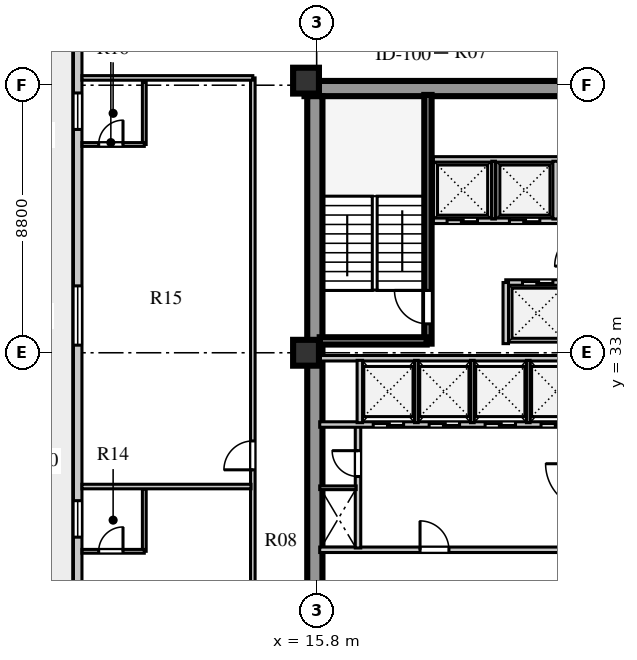
"""IFC4 building model, lengths in metres.
Left out: names, types, materials, properties, quantities, classifications, styles, units other than length and angle.
Written with IfcOpenShell. Run it as: python <this file> out.ifc"""

import sys

from ifc_helpers import new_model, si_unit, direction, frame, frame_2d, origin, origin_2d, place, context, subcontext, project, spatial, rectangle, extrude, element, fill, save


model = new_model("IFC4")
c1 = context("Model", 3, precision=1e-05, world=origin(), true_north=direction((0.0, 1.0)))
c2 = subcontext(c1, "Body", "Model", "MODEL_VIEW")
j1 = project(units=[si_unit("LENGTHUNIT", "METRE"), si_unit("PLANEANGLEUNIT", "RADIAN")], contexts=[c1])
p1 = place(None, origin())
s1 = spatial("IfcSite", under=j1, at=p1, CompositionType="ELEMENT")
p2 = place(p1, origin())
s2 = spatial("IfcBuilding", under=s1, at=p2, CompositionType="ELEMENT")
p3 = place(p2, frame((0.0, 0.0, 196.4)))
s3 = spatial("IfcBuildingStorey", under=s2, at=p3, CompositionType="ELEMENT", Elevation=196.4)
p4 = place(p3, frame((15.4, 41.69, 0.0), z_axis=(0.0, 0.0, 1.0), x_axis=(1.0, 0.0, 0.0)))
e1 = element("IfcWall", 1, at=p4, inside=s3, PredefinedType="SHEAR", context=c2, shape_type="SweptSolid", body=[
    extrude(rectangle(XDim=9.68, YDim=0.5, at=frame_2d((4.84, 0.0))), origin(), (0.0, 0.0, 1.0), 3.6),
])
p5 = place(p3, frame((15.74, 15.81, 0.0), z_axis=(0.0, 0.0, 1.0), x_axis=(0.0, 1.0, 0.0)))
e2 = element("IfcWall", 2, at=p5, inside=s3, PredefinedType="SHEAR", context=c2, shape_type="SweptSolid", body=[
    extrude(rectangle(XDim=25.63, YDim=0.5, at=frame_2d((12.815, 0.0))), origin(), (0.0, 0.0, 1.0), 3.6),
])
for number, where, z_axis, x_axis in (
    (3, (15.45, 33.0, 0.0), (0.0, 0.0, 1.0), (1.0, 0.0, 0.0)),
    (4, (15.45, 41.95, 0.0), (0.0, 0.0, 1.0), (1.0, 0.0, 0.0)),
):
    element("IfcColumn", number, at=place(p3, frame(where, z_axis=z_axis, x_axis=x_axis)), inside=s3, PredefinedType="COLUMN", context=c2, shape_type="SweptSolid", body=[
        extrude(rectangle(XDim=0.85, YDim=0.85, at=origin_2d()), origin(), (0.0, 0.0, 1.0), 3.6),
    ])
p6 = place(p3, frame((7.94, 44.07, 0.0), z_axis=(0.0, 0.0, 1.0), x_axis=(0.0, -1.0, 0.0)))
e5 = element("IfcWall", 5, at=p6, inside=s3, PredefinedType="STANDARD", context=c2, shape_type="SweptSolid", body=[
    extrude(rectangle(XDim=30.94, YDim=0.28, at=frame_2d((15.47, 0.0))), origin(), (0.0, 0.0, 1.0), 3.6),
])
p7 = place(p6, frame((27.42, 0.0, 0.0)))
e6 = element("IfcOpeningElement", 6, at=p7, cuts=e5, PredefinedType="OPENING", context=c2, shape_type="SweptSolid", body=[
    extrude(rectangle(XDim=1.0, YDim=2.05, at=frame_2d((0.5, 1.025))), frame((0.0, 0.15, 0.0), z_axis=(0.0, -1.0, 0.0), x_axis=(1.0, 0.0, 0.0)), (0.0, 0.0, 1.0), 0.3),
])
p8 = place(p6, frame((21.805, 0.0, 0.8)))
e7 = element("IfcOpeningElement", 7, at=p8, cuts=e5, PredefinedType="OPENING", context=c2, shape_type="SweptSolid", body=[
    extrude(rectangle(XDim=1.35, YDim=1.9, at=frame_2d((0.675, 0.95))), frame((0.0, 0.15, 0.0), z_axis=(0.0, -1.0, 0.0), x_axis=(1.0, 0.0, 0.0)), (0.0, 0.0, 1.0), 0.3),
])
p9 = place(p6, frame((15.935, 0.0, 0.8)))
e8 = element("IfcOpeningElement", 8, at=p9, cuts=e5, PredefinedType="OPENING", context=c2, shape_type="SweptSolid", body=[
    extrude(rectangle(XDim=1.2, YDim=1.75, at=frame_2d((0.6, 0.875))), frame((0.0, 0.15, 0.0), z_axis=(0.0, -1.0, 0.0), x_axis=(1.0, 0.0, 0.0)), (0.0, 0.0, 1.0), 0.3),
])
p10 = place(p6, frame((8.87, 0.0, 0.8)))
e9 = element("IfcOpeningElement", 9, at=p10, cuts=e5, PredefinedType="OPENING", context=c2, shape_type="SweptSolid", body=[
    extrude(rectangle(XDim=1.95, YDim=2.0, at=frame_2d((0.975, 1.0))), frame((0.0, 0.15, 0.0), z_axis=(0.0, -1.0, 0.0), x_axis=(1.0, 0.0, 0.0)), (0.0, 0.0, 1.0), 0.3),
])
p11 = place(p6, frame((2.525, 0.0, 0.8)))
e10 = element("IfcOpeningElement", 10, at=p11, cuts=e5, PredefinedType="OPENING", context=c2, shape_type="SweptSolid", body=[
    extrude(rectangle(XDim=1.2, YDim=1.75, at=frame_2d((0.6, 0.875))), frame((0.0, 0.15, 0.0), z_axis=(0.0, -1.0, 0.0), x_axis=(1.0, 0.0, 0.0)), (0.0, 0.0, 1.0), 0.3),
])
p12 = place(p3, frame((15.9, 26.52, 0.0), z_axis=(0.0, 0.0, 1.0), x_axis=(1.0, 0.0, 0.0)))
e11 = element("IfcWall", 11, at=p12, inside=s3, PredefinedType="SOLIDWALL", context=c2, shape_type="SweptSolid", body=[
    extrude(rectangle(XDim=8.68, YDim=0.18, at=frame_2d((4.34, 0.0))), origin(), (0.0, 0.0, 1.0), 3.6),
])
p13 = place(p12, frame((3.3, 0.0, 0.0)))
e12 = element("IfcOpeningElement", 12, at=p13, cuts=e11, PredefinedType="OPENING", context=c2, shape_type="SweptSolid", body=[
    extrude(rectangle(XDim=0.95, YDim=2.1, at=frame_2d((0.475, 1.05))), frame((0.0, 0.1, 0.0), z_axis=(0.0, -1.0, 0.0), x_axis=(1.0, 0.0, 0.0)), (0.0, 0.0, 1.0), 0.2),
])
p14 = place(p3, frame((17.16, 26.58, 0.0), z_axis=(0.0, 0.0, 1.0), x_axis=(0.0, 1.0, 0.0)))
e13 = element("IfcWall", 13, at=p14, inside=s3, PredefinedType="SOLIDWALL", context=c2, shape_type="SweptSolid", body=[
    extrude(rectangle(XDim=4.02, YDim=0.18, at=frame_2d((2.01, 0.0))), origin(), (0.0, 0.0, 1.0), 3.6),
])
p15 = place(p14, frame((2.35, 0.0, 0.0)))
e14 = element("IfcOpeningElement", 14, at=p15, cuts=e13, PredefinedType="OPENING", context=c2, shape_type="SweptSolid", body=[
    extrude(rectangle(XDim=0.85, YDim=2.06, at=frame_2d((0.425, 1.03))), frame((0.0, 0.1, 0.0), z_axis=(0.0, -1.0, 0.0), x_axis=(1.0, 0.0, 0.0)), (0.0, 0.0, 1.0), 0.2),
])
p16 = place(p3, frame((15.9, 28.56, 0.0), z_axis=(0.0, 0.0, 1.0), x_axis=(1.0, 0.0, 0.0)))
e15 = element("IfcWall", 15, at=p16, inside=s3, PredefinedType="PARTITIONING", context=c2, shape_type="SweptSolid", body=[
    extrude(rectangle(XDim=1.2, YDim=0.12, at=frame_2d((0.6, 0.0))), origin(), (0.0, 0.0, 1.0), 3.6),
])
p17 = place(p3, frame((15.9, 30.64, 0.0), z_axis=(0.0, 0.0, 1.0), x_axis=(1.0, 0.0, 0.0)))
e16 = element("IfcWall", 16, at=p17, inside=s3, PredefinedType="SOLIDWALL", context=c2, shape_type="SweptSolid", body=[
    extrude(rectangle(XDim=8.68, YDim=0.18, at=frame_2d((4.34, 0.0))), origin(), (0.0, 0.0, 1.0), 3.6),
])
p18 = place(p17, frame((1.76, 0.0, 0.0)))
e17 = element("IfcOpeningElement", 17, at=p18, cuts=e16, PredefinedType="OPENING", context=c2, shape_type="SweptSolid", body=[
    extrude(rectangle(XDim=1.0, YDim=2.1, at=frame_2d((0.5, 1.05))), frame((0.0, 0.1, 0.0), z_axis=(0.0, -1.0, 0.0), x_axis=(1.0, 0.0, 0.0)), (0.0, 0.0, 1.0), 0.2),
])
p19 = place(p17, frame((3.6, 0.0, 0.0)))
e18 = element("IfcOpeningElement", 18, at=p19, cuts=e16, PredefinedType="OPENING", context=c2, shape_type="SweptSolid", body=[
    extrude(rectangle(XDim=1.0, YDim=2.1, at=frame_2d((0.5, 1.05))), frame((0.0, 0.1, 0.0), z_axis=(0.0, -1.0, 0.0), x_axis=(1.0, 0.0, 0.0)), (0.0, 0.0, 1.0), 0.2),
])
p20 = place(p17, frame((5.44, 0.0, 0.0)))
e19 = element("IfcOpeningElement", 19, at=p20, cuts=e16, PredefinedType="OPENING", context=c2, shape_type="SweptSolid", body=[
    extrude(rectangle(XDim=1.0, YDim=2.1, at=frame_2d((0.5, 1.05))), frame((0.0, 0.1, 0.0), z_axis=(0.0, -1.0, 0.0), x_axis=(1.0, 0.0, 0.0)), (0.0, 0.0, 1.0), 0.2),
])
p21 = place(p17, frame((7.28, 0.0, 0.0)))
e20 = element("IfcOpeningElement", 20, at=p21, cuts=e16, PredefinedType="OPENING", context=c2, shape_type="SweptSolid", body=[
    extrude(rectangle(XDim=1.0, YDim=2.1, at=frame_2d((0.5, 1.05))), frame((0.0, 0.1, 0.0), z_axis=(0.0, -1.0, 0.0), x_axis=(1.0, 0.0, 0.0)), (0.0, 0.0, 1.0), 0.2),
])
p22 = place(p3, frame((15.9, 32.82, 0.0), z_axis=(0.0, 0.0, 1.0), x_axis=(1.0, 0.0, 0.0)))
e21 = element("IfcWall", 21, at=p22, inside=s3, PredefinedType="SOLIDWALL", context=c2, shape_type="SweptSolid", body=[
    extrude(rectangle(XDim=8.68, YDim=0.18, at=frame_2d((4.34, 0.0))), origin(), (0.0, 0.0, 1.0), 2.95),
])
p23 = place(p3, frame((17.22, 30.7, 0.0), z_axis=(0.0, 0.0, 1.0), x_axis=(0.0, 1.0, 0.0)))
e22 = element("IfcWall", 22, at=p23, inside=s3, PredefinedType="SOLIDWALL", context=c2, shape_type="SweptSolid", body=[
    extrude(rectangle(XDim=2.05, YDim=0.18, at=frame_2d((1.025, 0.0))), origin(), (0.0, 0.0, 1.0), 3.6),
])
for number, where, z_axis, x_axis in (
    (23, (19.08, 30.7, 0.0), (0.0, 0.0, 1.0), (0.0, 1.0, 0.0)),
    (24, (20.92, 30.7, 0.0), (0.0, 0.0, 1.0), (0.0, 1.0, 0.0)),
    (25, (22.76, 30.7, 0.0), (0.0, 0.0, 1.0), (0.0, 1.0, 0.0)),
):
    element("IfcWall", number, at=place(p3, frame(where, z_axis=z_axis, x_axis=x_axis)), inside=s3, PredefinedType="PARTITIONING", context=c2, shape_type="SweptSolid", body=[
        extrude(rectangle(XDim=2.05, YDim=0.12, at=frame_2d((1.025, 0.0))), origin(), (0.0, 0.0, 1.0), 3.6),
    ])
p24 = place(p3, frame((19.46, 33.3, 0.0), z_axis=(0.0, 0.0, 1.0), x_axis=(0.0, 1.0, 0.0)))
e26 = element("IfcWall", 26, at=p24, inside=s3, PredefinedType="SHEAR", context=c2, shape_type="SweptSolid", body=[
    extrude(rectangle(XDim=8.18, YDim=0.24, at=frame_2d((4.09, 0.0))), origin(), (0.0, 0.0, 1.0), 3.85),
])
p25 = place(p24, frame((0.65, 0.0, 0.0)))
e27 = element("IfcOpeningElement", 27, at=p25, cuts=e26, PredefinedType="OPENING", context=c2, shape_type="SweptSolid", body=[
    extrude(rectangle(XDim=1.1, YDim=2.1, at=frame_2d((0.55, 1.05))), frame((0.0, 0.13, 0.0), z_axis=(0.0, -1.0, 0.0), x_axis=(1.0, 0.0, 0.0)), (0.0, 0.0, 1.0), 0.26),
])
p26 = place(p3, frame((15.9, 33.39, 0.0), z_axis=(0.0, 0.0, 1.0), x_axis=(1.0, 0.0, 0.0)))
e28 = element("IfcWall", 28, at=p26, inside=s3, PredefinedType="SHEAR", context=c2, shape_type="SweptSolid", body=[
    extrude(rectangle(XDim=3.52, YDim=0.24, at=frame_2d((1.76, 0.0))), origin(), (0.0, 0.0, 1.0), 3.85),
])
p27 = place(p3, frame((22.02, 35.31, 0.0), z_axis=(0.0, 0.0, 1.0), x_axis=(1.0, 0.0, 0.0)))
e29 = element("IfcWall", 29, at=p27, inside=s3, PredefinedType="SOLIDWALL", context=c2, shape_type="SweptSolid", body=[
    extrude(rectangle(XDim=2.56, YDim=0.18, at=frame_2d((1.28, 0.0))), origin(), (0.0, 0.0, 1.0), 3.6),
])
p28 = place(p27, frame((0.55, 0.0, 0.0)))
e30 = element("IfcOpeningElement", 30, at=p28, cuts=e29, PredefinedType="OPENING", context=c2, shape_type="SweptSolid", body=[
    extrude(rectangle(XDim=1.0, YDim=2.1, at=frame_2d((0.5, 1.05))), frame((0.0, 0.1, 0.0), z_axis=(0.0, -1.0, 0.0), x_axis=(1.0, 0.0, 0.0)), (0.0, 0.0, 1.0), 0.2),
])
p29 = place(p3, frame((22.02, 33.3, 0.0), z_axis=(0.0, 0.0, 1.0), x_axis=(0.0, 1.0, 0.0)))
e31 = element("IfcWall", 31, at=p29, inside=s3, PredefinedType="SOLIDWALL", context=c2, shape_type="SweptSolid", body=[
    extrude(rectangle(XDim=2.01, YDim=0.18, at=frame_2d((1.005, 0.0))), origin(), (0.0, 0.0, 1.0), 3.6),
])
p30 = place(p3, frame((19.64, 37.34, 0.0), z_axis=(0.0, 0.0, 1.0), x_axis=(1.0, 0.0, 0.0)))
e32 = element("IfcWall", 32, at=p30, inside=s3, PredefinedType="SOLIDWALL", context=c2, shape_type="SweptSolid", body=[
    extrude(rectangle(XDim=4.94, YDim=0.18, at=frame_2d((2.47, 0.0))), origin(), (0.0, 0.0, 1.0), 3.6),
])
p31 = place(p30, frame((0.45, 0.0, 0.0)))
e33 = element("IfcOpeningElement", 33, at=p31, cuts=e32, PredefinedType="OPENING", context=c2, shape_type="SweptSolid", body=[
    extrude(rectangle(XDim=1.0, YDim=2.1, at=frame_2d((0.5, 1.05))), frame((0.0, 0.1, 0.0), z_axis=(0.0, -1.0, 0.0), x_axis=(1.0, 0.0, 0.0)), (0.0, 0.0, 1.0), 0.2),
])
p32 = place(p30, frame((2.5, 0.0, 0.0)))
e34 = element("IfcOpeningElement", 34, at=p32, cuts=e32, PredefinedType="OPENING", context=c2, shape_type="SweptSolid", body=[
    extrude(rectangle(XDim=1.0, YDim=2.1, at=frame_2d((0.5, 1.05))), frame((0.0, 0.1, 0.0), z_axis=(0.0, -1.0, 0.0), x_axis=(1.0, 0.0, 0.0)), (0.0, 0.0, 1.0), 0.2),
])
p33 = place(p3, frame((19.64, 39.36, 0.0), z_axis=(0.0, 0.0, 1.0), x_axis=(1.0, 0.0, 0.0)))
e35 = element("IfcWall", 35, at=p33, inside=s3, PredefinedType="SOLIDWALL", context=c2, shape_type="SweptSolid", body=[
    extrude(rectangle(XDim=4.94, YDim=0.18, at=frame_2d((2.47, 0.0))), origin(), (0.0, 0.0, 1.0), 3.6),
])
p34 = place(p3, frame((21.62, 37.4, 0.0), z_axis=(0.0, 0.0, 1.0), x_axis=(0.0, 1.0, 0.0)))
e36 = element("IfcWall", 36, at=p34, inside=s3, PredefinedType="PARTITIONING", context=c2, shape_type="SweptSolid", body=[
    extrude(rectangle(XDim=1.9, YDim=0.12, at=frame_2d((0.95, 0.0))), origin(), (0.0, 0.0, 1.0), 3.6),
])
p35 = place(p3, frame((23.66, 37.4, 0.0), z_axis=(0.0, 0.0, 1.0), x_axis=(0.0, 1.0, 0.0)))
e37 = element("IfcWall", 37, at=p35, inside=s3, PredefinedType="SOLIDWALL", context=c2, shape_type="SweptSolid", body=[
    extrude(rectangle(XDim=1.9, YDim=0.18, at=frame_2d((0.95, 0.0))), origin(), (0.0, 0.0, 1.0), 3.6),
])
p36 = place(p3, frame((13.7, 15.16, 0.0), z_axis=(0.0, 0.0, 1.0), x_axis=(0.0, 1.0, 0.0)))
e38 = element("IfcWall", 38, at=p36, inside=s3, PredefinedType="PARTITIONING", context=c2, shape_type="SweptSolid", body=[
    extrude(rectangle(XDim=26.88, YDim=0.15, at=frame_2d((13.44, 0.0))), origin(), (0.0, 0.0, 1.0), 3.6),
])
p37 = place(p36, frame((0.91, 0.0, 0.0)))
e39 = element("IfcOpeningElement", 39, at=p37, cuts=e38, PredefinedType="OPENING", context=c2, shape_type="SweptSolid", body=[
    extrude(rectangle(XDim=0.95, YDim=2.1, at=frame_2d((0.475, 1.05))), frame((0.0, 0.085, 0.0), z_axis=(0.0, -1.0, 0.0), x_axis=(1.0, 0.0, 0.0)), (0.0, 0.0, 1.0), 0.17),
])
p38 = place(p36, frame((13.99, 0.0, 0.0)))
e40 = element("IfcOpeningElement", 40, at=p38, cuts=e38, PredefinedType="OPENING", context=c2, shape_type="SweptSolid", body=[
    extrude(rectangle(XDim=0.95, YDim=2.1, at=frame_2d((0.475, 1.05))), frame((0.0, 0.085, 0.0), z_axis=(0.0, -1.0, 0.0), x_axis=(1.0, 0.0, 0.0)), (0.0, 0.0, 1.0), 0.17),
])
p39 = place(p3, frame((8.08, 42.04, 0.0), z_axis=(0.0, 0.0, 1.0), x_axis=(1.0, 0.0, 0.0)))
e41 = element("IfcWall", 41, at=p39, inside=s3, PredefinedType="PARTITIONING", context=c2, shape_type="SweptSolid", body=[
    extrude(rectangle(XDim=5.62, YDim=0.15, at=frame_2d((2.81, 0.0))), origin(), (0.0, 0.0, 1.0), 3.15),
])
p40 = place(p3, frame((10.13, 26.47, 0.0), z_axis=(0.0, 0.0, 1.0), x_axis=(0.0, 1.0, 0.0)))
e42 = element("IfcWall", 42, at=p40, inside=s3, PredefinedType="PLUMBINGWALL", context=c2, shape_type="SweptSolid", body=[
    extrude(rectangle(XDim=2.05, YDim=0.125, at=frame_2d((1.025, 0.0))), origin(), (0.0, 0.0, 1.0), 3.6),
])
p41 = place(p3, frame((8.08, 26.47, 0.0), z_axis=(0.0, 0.0, 1.0), x_axis=(1.0, 0.0, 0.0)))
e43 = element("IfcWall", 43, at=p41, inside=s3, PredefinedType="PLUMBINGWALL", context=c2, shape_type="SweptSolid", body=[
    extrude(rectangle(XDim=2.05, YDim=0.125, at=frame_2d((1.025, 0.0))), origin(), (0.0, 0.0, 1.0), 3.6),
])
p42 = place(p41, frame((0.55, 0.0, 0.0)))
e44 = element("IfcOpeningElement", 44, at=p42, cuts=e43, PredefinedType="OPENING", context=c2, shape_type="SweptSolid", body=[
    extrude(rectangle(XDim=0.8, YDim=2.05, at=frame_2d((0.4, 1.025))), frame((0.0, 0.073, 0.0), z_axis=(0.0, -1.0, 0.0), x_axis=(1.0, 0.0, 0.0)), (0.0, 0.0, 1.0), 0.145),
])
p43 = place(p3, frame((8.08, 28.6, 0.0), z_axis=(0.0, 0.0, 1.0), x_axis=(1.0, 0.0, 0.0)))
e45 = element("IfcWall", 45, at=p43, inside=s3, PredefinedType="PARTITIONING", context=c2, shape_type="SweptSolid", body=[
    extrude(rectangle(XDim=5.56, YDim=0.15, at=frame_2d((2.78, 0.0))), origin(), (0.0, 0.0, 1.0), 3.6),
])
p44 = place(p3, frame((10.13, 39.85, 0.0), z_axis=(0.0, 0.0, 1.0), x_axis=(0.0, 1.0, 0.0)))
e46 = element("IfcWall", 46, at=p44, inside=s3, PredefinedType="PLUMBINGWALL", context=c2, shape_type="SweptSolid", body=[
    extrude(rectangle(XDim=2.05, YDim=0.125, at=frame_2d((1.025, 0.0))), origin(), (0.0, 0.0, 1.0), 3.6),
])
p45 = place(p3, frame((8.08, 39.85, 0.0), z_axis=(0.0, 0.0, 1.0), x_axis=(1.0, 0.0, 0.0)))
e47 = element("IfcWall", 47, at=p45, inside=s3, PredefinedType="PLUMBINGWALL", context=c2, shape_type="SweptSolid", body=[
    extrude(rectangle(XDim=2.05, YDim=0.125, at=frame_2d((1.025, 0.0))), origin(), (0.0, 0.0, 1.0), 3.6),
])
p46 = place(p45, frame((0.55, 0.0, 0.0)))
e48 = element("IfcOpeningElement", 48, at=p46, cuts=e47, PredefinedType="OPENING", context=c2, shape_type="SweptSolid", body=[
    extrude(rectangle(XDim=0.8, YDim=2.05, at=frame_2d((0.4, 1.025))), frame((0.0, 0.073, 0.0), z_axis=(0.0, -1.0, 0.0), x_axis=(1.0, 0.0, 0.0)), (0.0, 0.0, 1.0), 0.145),
])
p47 = place(p9, origin())
e49 = element("IfcWindow", 49, at=p47, inside=s3, PartitioningType="SINGLE_PANEL", PredefinedType="WINDOW", context=c2, shape_type="SweptSolid", body=[
    extrude(rectangle(XDim=1.2, YDim=1.75, at=frame_2d((0.6, 0.875))), frame((0.0, 0.03, 0.0), z_axis=(0.0, -1.0, 0.0), x_axis=(1.0, 0.0, 0.0)), (0.0, 0.0, 1.0), 0.06),
])
fill(e8, e49)
p48 = place(p10, origin())
e50 = element("IfcWindow", 50, at=p48, inside=s3, PartitioningType="SINGLE_PANEL", PredefinedType="WINDOW", context=c2, shape_type="SweptSolid", body=[
    extrude(rectangle(XDim=1.95, YDim=2.0, at=frame_2d((0.975, 1.0))), frame((0.0, 0.03, 0.0), z_axis=(0.0, -1.0, 0.0), x_axis=(1.0, 0.0, 0.0)), (0.0, 0.0, 1.0), 0.06),
])
fill(e9, e50)
p49 = place(p11, origin())
e51 = element("IfcWindow", 51, at=p49, inside=s3, PartitioningType="SINGLE_PANEL", PredefinedType="WINDOW", context=c2, shape_type="SweptSolid", body=[
    extrude(rectangle(XDim=1.2, YDim=1.75, at=frame_2d((0.6, 0.875))), frame((0.0, 0.03, 0.0), z_axis=(0.0, -1.0, 0.0), x_axis=(1.0, 0.0, 0.0)), (0.0, 0.0, 1.0), 0.06),
])
fill(e10, e51)
p50 = place(p13, origin())
e52 = element("IfcDoor", 52, at=p50, inside=s3, OperationType="SINGLE_SWING_LEFT", PredefinedType="DOOR", context=c2, shape_type="SweptSolid", body=[
    extrude(rectangle(XDim=0.95, YDim=2.1, at=frame_2d((0.475, 1.05))), frame((0.0, 0.025, 0.0), z_axis=(0.0, -1.0, 0.0), x_axis=(1.0, 0.0, 0.0)), (0.0, 0.0, 1.0), 0.05),
])
fill(e12, e52)
p51 = place(p15, origin())
e53 = element("IfcDoor", 53, at=p51, inside=s3, OperationType="SINGLE_SWING_RIGHT", PredefinedType="DOOR", context=c2, shape_type="SweptSolid", body=[
    extrude(rectangle(XDim=0.85, YDim=2.06, at=frame_2d((0.425, 1.03))), frame((0.0, 0.025, 0.0), z_axis=(0.0, -1.0, 0.0), x_axis=(1.0, 0.0, 0.0)), (0.0, 0.0, 1.0), 0.05),
])
fill(e14, e53)
p52 = place(p18, frame((1.0, 0.0, 0.0), z_axis=(0.0, 0.0, 1.0), x_axis=(-1.0, 0.0, 0.0)))
e54 = element("IfcDoor", 54, at=p52, inside=s3, OperationType="DOUBLE_DOOR_SLIDING", PredefinedType="DOOR", context=c2, shape_type="SweptSolid", body=[
    extrude(rectangle(XDim=1.0, YDim=2.1, at=frame_2d((0.5, 1.05))), frame((0.0, 0.025, 0.0), z_axis=(0.0, -1.0, 0.0), x_axis=(1.0, 0.0, 0.0)), (0.0, 0.0, 1.0), 0.05),
])
fill(e17, e54)
p53 = place(p19, frame((1.0, 0.0, 0.0), z_axis=(0.0, 0.0, 1.0), x_axis=(-1.0, 0.0, 0.0)))
e55 = element("IfcDoor", 55, at=p53, inside=s3, OperationType="DOUBLE_DOOR_SLIDING", PredefinedType="DOOR", context=c2, shape_type="SweptSolid", body=[
    extrude(rectangle(XDim=1.0, YDim=2.1, at=frame_2d((0.5, 1.05))), frame((0.0, 0.025, 0.0), z_axis=(0.0, -1.0, 0.0), x_axis=(1.0, 0.0, 0.0)), (0.0, 0.0, 1.0), 0.05),
])
fill(e18, e55)
p54 = place(p20, frame((1.0, 0.0, 0.0), z_axis=(0.0, 0.0, 1.0), x_axis=(-1.0, 0.0, 0.0)))
e56 = element("IfcDoor", 56, at=p54, inside=s3, OperationType="DOUBLE_DOOR_SLIDING", PredefinedType="DOOR", context=c2, shape_type="SweptSolid", body=[
    extrude(rectangle(XDim=1.0, YDim=2.1, at=frame_2d((0.5, 1.05))), frame((0.0, 0.025, 0.0), z_axis=(0.0, -1.0, 0.0), x_axis=(1.0, 0.0, 0.0)), (0.0, 0.0, 1.0), 0.05),
])
fill(e19, e56)
p55 = place(p21, frame((1.0, 0.0, 0.0), z_axis=(0.0, 0.0, 1.0), x_axis=(-1.0, 0.0, 0.0)))
e57 = element("IfcDoor", 57, at=p55, inside=s3, OperationType="DOUBLE_DOOR_SLIDING", PredefinedType="DOOR", context=c2, shape_type="SweptSolid", body=[
    extrude(rectangle(XDim=1.0, YDim=2.1, at=frame_2d((0.5, 1.05))), frame((0.0, 0.025, 0.0), z_axis=(0.0, -1.0, 0.0), x_axis=(1.0, 0.0, 0.0)), (0.0, 0.0, 1.0), 0.05),
])
fill(e20, e57)
p56 = place(p25, origin())
e58 = element("IfcDoor", 58, at=p56, inside=s3, OperationType="SINGLE_SWING_RIGHT", PredefinedType="DOOR", context=c2, shape_type="SweptSolid", body=[
    extrude(rectangle(XDim=1.1, YDim=2.1, at=frame_2d((0.55, 1.05))), frame((0.0, 0.025, 0.0), z_axis=(0.0, -1.0, 0.0), x_axis=(1.0, 0.0, 0.0)), (0.0, 0.0, 1.0), 0.05),
])
fill(e27, e58)
p57 = place(p31, frame((1.0, 0.0, 0.0), z_axis=(0.0, 0.0, 1.0), x_axis=(-1.0, 0.0, 0.0)))
e59 = element("IfcDoor", 59, at=p57, inside=s3, OperationType="DOUBLE_DOOR_SLIDING", PredefinedType="DOOR", context=c2, shape_type="SweptSolid", body=[
    extrude(rectangle(XDim=1.0, YDim=2.1, at=frame_2d((0.5, 1.05))), frame((0.0, 0.025, 0.0), z_axis=(0.0, -1.0, 0.0), x_axis=(1.0, 0.0, 0.0)), (0.0, 0.0, 1.0), 0.05),
])
fill(e33, e59)
p58 = place(p32, frame((1.0, 0.0, 0.0), z_axis=(0.0, 0.0, 1.0), x_axis=(-1.0, 0.0, 0.0)))
e60 = element("IfcDoor", 60, at=p58, inside=s3, OperationType="DOUBLE_DOOR_SLIDING", PredefinedType="DOOR", context=c2, shape_type="SweptSolid", body=[
    extrude(rectangle(XDim=1.0, YDim=2.1, at=frame_2d((0.5, 1.05))), frame((0.0, 0.025, 0.0), z_axis=(0.0, -1.0, 0.0), x_axis=(1.0, 0.0, 0.0)), (0.0, 0.0, 1.0), 0.05),
])
fill(e34, e60)
p59 = place(p28, origin())
e61 = element("IfcDoor", 61, at=p59, inside=s3, OperationType="DOUBLE_DOOR_SLIDING", PredefinedType="DOOR", context=c2, shape_type="SweptSolid", body=[
    extrude(rectangle(XDim=1.0, YDim=2.1, at=frame_2d((0.5, 1.05))), frame((0.0, 0.025, 0.0), z_axis=(0.0, -1.0, 0.0), x_axis=(1.0, 0.0, 0.0)), (0.0, 0.0, 1.0), 0.05),
])
fill(e30, e61)
p60 = place(p42, frame((0.8, 0.0, 0.0), z_axis=(0.0, 0.0, 1.0), x_axis=(-1.0, 0.0, 0.0)))
e62 = element("IfcDoor", 62, at=p60, inside=s3, OperationType="SINGLE_SWING_LEFT", PredefinedType="DOOR", context=c2, shape_type="SweptSolid", body=[
    extrude(rectangle(XDim=0.8, YDim=2.05, at=frame_2d((0.4, 1.025))), frame((0.0, 0.025, 0.0), z_axis=(0.0, -1.0, 0.0), x_axis=(1.0, 0.0, 0.0)), (0.0, 0.0, 1.0), 0.05),
])
fill(e44, e62)
p61 = place(p38, origin())
e63 = element("IfcDoor", 63, at=p61, inside=s3, OperationType="SINGLE_SWING_LEFT", PredefinedType="DOOR", context=c2, shape_type="SweptSolid", body=[
    extrude(rectangle(XDim=0.95, YDim=2.1, at=frame_2d((0.475, 1.05))), frame((0.0, 0.025, 0.0), z_axis=(0.0, -1.0, 0.0), x_axis=(1.0, 0.0, 0.0)), (0.0, 0.0, 1.0), 0.05),
])
fill(e40, e63)
p62 = place(p46, frame((0.8, 0.0, 0.0), z_axis=(0.0, 0.0, 1.0), x_axis=(-1.0, 0.0, 0.0)))
e64 = element("IfcDoor", 64, at=p62, inside=s3, OperationType="SINGLE_SWING_LEFT", PredefinedType="DOOR", context=c2, shape_type="SweptSolid", body=[
    extrude(rectangle(XDim=0.8, YDim=2.05, at=frame_2d((0.4, 1.025))), frame((0.0, 0.025, 0.0), z_axis=(0.0, -1.0, 0.0), x_axis=(1.0, 0.0, 0.0)), (0.0, 0.0, 1.0), 0.05),
])
fill(e48, e64)
save(model, sys.argv[1])
